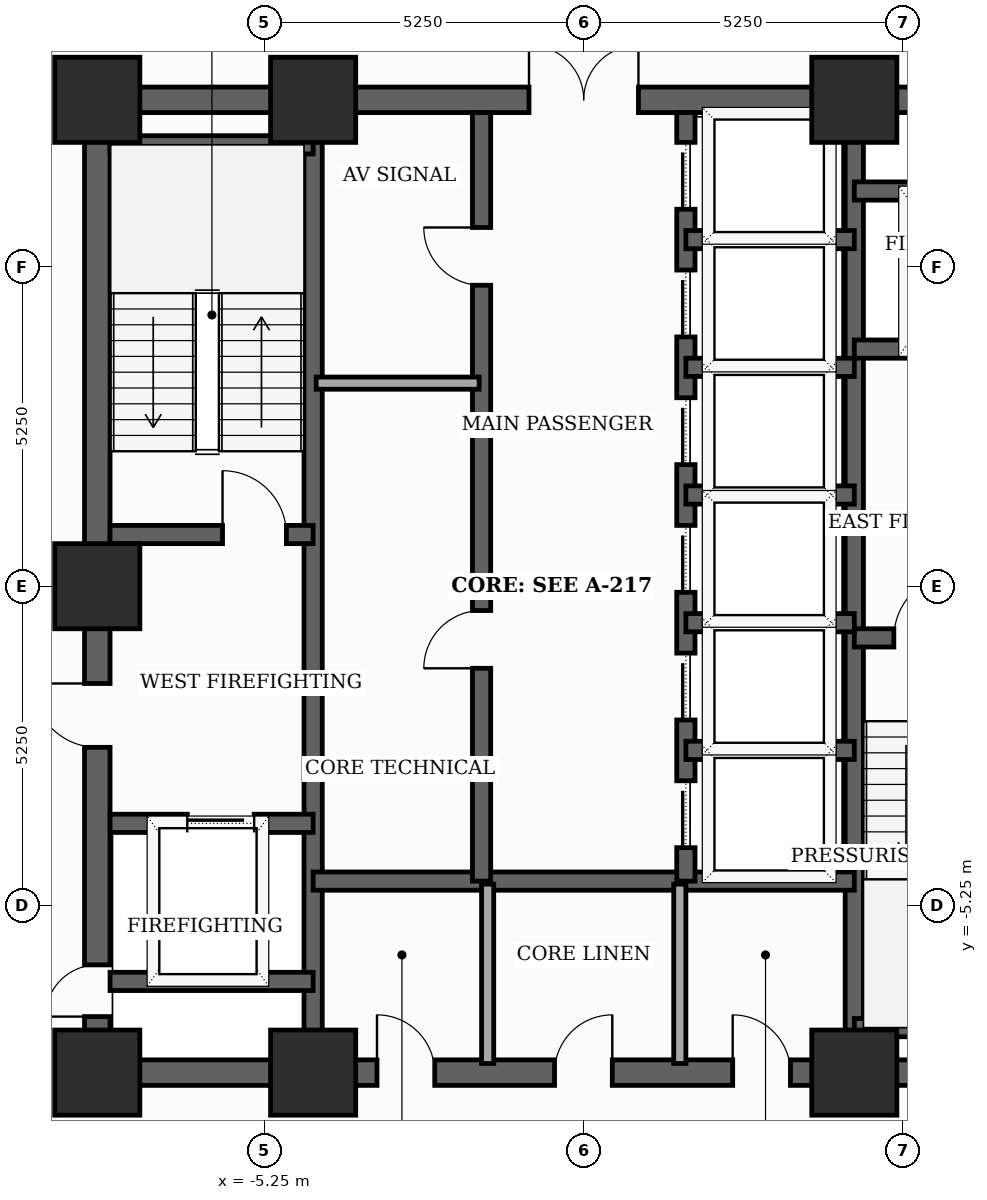
"""IFC4 building model, lengths in metres.
Left out: names, types, materials, properties, quantities, classifications, styles, units other than length and angle.
Written with IfcOpenShell. Run it as: python <this file> out.ifc"""

import sys

from ifc_helpers import new_model, si_unit, direction, frame, frame_2d, origin, origin_2d, place, context, subcontext, project, spatial, rectangle, extrude, element, fill, save


model = new_model("IFC4")
c1 = context("Model", 3, precision=1e-05, world=origin(), true_north=direction((0.0, 1.0)))
c2 = subcontext(c1, "Body", "Model", "MODEL_VIEW")
j1 = project(units=[si_unit("LENGTHUNIT", "METRE"), si_unit("PLANEANGLEUNIT", "RADIAN")], contexts=[c1])
p1 = place(None, origin())
s1 = spatial("IfcSite", under=j1, at=p1, CompositionType="ELEMENT")
p2 = place(p1, origin())
s2 = spatial("IfcBuilding", under=s1, at=p2, CompositionType="ELEMENT")
p3 = place(p2, frame((0.0, 0.0, 138.4)))
s3 = spatial("IfcBuildingStorey", under=s2, at=p3, CompositionType="ELEMENT", Elevation=138.4)
for number, where, z_axis, x_axis in (
    (1, (-8.0, -8.0, 0.0), (0.0, 0.0, 1.0), (1.0, 0.0, 0.0)),
    (2, (-4.45, -8.0, 0.0), (0.0, 0.0, 1.0), (1.0, 0.0, 0.0)),
    (3, (4.45, -8.0, 0.0), (0.0, 0.0, 1.0), (1.0, 0.0, 0.0)),
    (4, (4.45, 8.0, 0.0), (0.0, 0.0, 1.0), (1.0, 0.0, 0.0)),
    (5, (-4.45, 8.0, 0.0), (0.0, 0.0, 1.0), (1.0, 0.0, 0.0)),
    (6, (-8.0, 8.0, 0.0), (0.0, 0.0, 1.0), (1.0, 0.0, 0.0)),
    (7, (-8.0, 0.0, 0.0), (0.0, 0.0, 1.0), (1.0, 0.0, 0.0)),
):
    element("IfcColumn", number, at=place(p3, frame(where, z_axis=z_axis, x_axis=x_axis)), inside=s3, PredefinedType="COLUMN", context=c2, shape_type="SweptSolid", body=[
        extrude(rectangle(XDim=1.4, YDim=1.4, at=origin_2d()), origin(), (0.0, 0.0, 1.0), 3.7),
    ])
p4 = place(p3, frame((-8.0, -8.0, 0.0), z_axis=(0.0, 0.0, 1.0), x_axis=(0.0, 1.0, 0.0)))
e8 = element("IfcWall", 8, at=p4, inside=s3, PredefinedType="SHEAR", context=c2, shape_type="SweptSolid", body=[
    extrude(rectangle(XDim=16.0, YDim=0.42, at=frame_2d((8.0, 0.0))), origin(), (0.0, 0.0, 1.0), 3.5),
])
p5 = place(p4, frame((0.922, 0.0, 0.0)))
e9 = element("IfcOpeningElement", 9, at=p5, cuts=e8, PredefinedType="OPENING", context=c2, shape_type="SweptSolid", body=[
    extrude(rectangle(XDim=0.85, YDim=2.02, at=frame_2d((0.425, 1.01))), frame((0.0, 0.22, 0.0), z_axis=(0.0, -1.0, 0.0), x_axis=(1.0, 0.0, 0.0)), (0.0, 0.0, 1.0), 0.44),
])
p6 = place(p4, frame((5.35, 0.0, 0.0)))
e10 = element("IfcOpeningElement", 10, at=p6, cuts=e8, PredefinedType="OPENING", context=c2, shape_type="SweptSolid", body=[
    extrude(rectangle(XDim=1.05, YDim=2.15, at=frame_2d((0.525, 1.075))), frame((0.0, 0.22, 0.0), z_axis=(0.0, -1.0, 0.0), x_axis=(1.0, 0.0, 0.0)), (0.0, 0.0, 1.0), 0.44),
])
p7 = place(p3, frame((-8.0, -8.0, 0.0), z_axis=(0.0, 0.0, 1.0), x_axis=(1.0, 0.0, 0.0)))
e11 = element("IfcWall", 11, at=p7, inside=s3, PredefinedType="SHEAR", context=c2, shape_type="SweptSolid", body=[
    extrude(rectangle(XDim=16.0, YDim=0.42, at=frame_2d((8.0, 0.0))), origin(), (0.0, 0.0, 1.0), 3.5),
])
p8 = place(p7, frame((4.6, 0.0, 0.0)))
e12 = element("IfcOpeningElement", 12, at=p8, cuts=e11, PredefinedType="OPENING", context=c2, shape_type="SweptSolid", body=[
    extrude(rectangle(XDim=0.95, YDim=2.1, at=frame_2d((0.475, 1.05))), frame((0.0, 0.22, 0.0), z_axis=(0.0, -1.0, 0.0), x_axis=(1.0, 0.0, 0.0)), (0.0, 0.0, 1.0), 0.44),
])
p9 = place(p7, frame((7.52, 0.0, 0.0)))
e13 = element("IfcOpeningElement", 13, at=p9, cuts=e11, PredefinedType="OPENING", context=c2, shape_type="SweptSolid", body=[
    extrude(rectangle(XDim=0.95, YDim=2.1, at=frame_2d((0.475, 1.05))), frame((0.0, 0.22, 0.0), z_axis=(0.0, -1.0, 0.0), x_axis=(1.0, 0.0, 0.0)), (0.0, 0.0, 1.0), 0.44),
])
p10 = place(p7, frame((10.45, 0.0, 0.0)))
e14 = element("IfcOpeningElement", 14, at=p10, cuts=e11, PredefinedType="OPENING", context=c2, shape_type="SweptSolid", body=[
    extrude(rectangle(XDim=0.95, YDim=2.1, at=frame_2d((0.475, 1.05))), frame((0.0, 0.22, 0.0), z_axis=(0.0, -1.0, 0.0), x_axis=(1.0, 0.0, 0.0)), (0.0, 0.0, 1.0), 0.44),
])
p11 = place(p3, frame((-8.0, 8.0, 0.0), z_axis=(0.0, 0.0, 1.0), x_axis=(1.0, 0.0, 0.0)))
e15 = element("IfcWall", 15, at=p11, inside=s3, PredefinedType="SHEAR", context=c2, shape_type="SweptSolid", body=[
    extrude(rectangle(XDim=16.0, YDim=0.42, at=frame_2d((8.0, 0.0))), origin(), (0.0, 0.0, 1.0), 3.5),
])
p12 = place(p11, frame((7.1, 0.0, 0.0)))
e16 = element("IfcOpeningElement", 16, at=p12, cuts=e15, PredefinedType="OPENING", context=c2, shape_type="SweptSolid", body=[
    extrude(rectangle(XDim=1.8, YDim=2.15, at=frame_2d((0.9, 1.075))), frame((0.0, 0.22, 0.0), z_axis=(0.0, -1.0, 0.0), x_axis=(1.0, 0.0, 0.0)), (0.0, 0.0, 1.0), 0.44),
])
for number, where, z_axis, x_axis in (
    (17, (-4.45, -7.79, 0.0), (0.0, 0.0, 1.0), (0.0, 1.0, 0.0)),
    (18, (4.45, -7.79, 0.0), (0.0, 0.0, 1.0), (0.0, 1.0, 0.0)),
):
    element("IfcWall", number, at=place(p3, frame(where, z_axis=z_axis, x_axis=x_axis)), inside=s3, PredefinedType="SHEAR", context=c2, shape_type="SweptSolid", body=[
        extrude(rectangle(XDim=15.58, YDim=0.3, at=frame_2d((7.79, 0.0))), origin(), (0.0, 0.0, 1.0), 3.5),
    ])
p13 = place(p3, frame((-7.79, 0.85, 0.0), z_axis=(0.0, 0.0, 1.0), x_axis=(1.0, 0.0, 0.0)))
e19 = element("IfcWall", 19, at=p13, inside=s3, PredefinedType="SHEAR", context=c2, shape_type="SweptSolid", body=[
    extrude(rectangle(XDim=3.34, YDim=0.3, at=frame_2d((1.67, 0.0))), origin(), (0.0, 0.0, 1.0), 3.5),
])
p14 = place(p13, frame((1.85, 0.0, 0.0)))
e20 = element("IfcOpeningElement", 20, at=p14, cuts=e19, PredefinedType="OPENING", context=c2, shape_type="SweptSolid", body=[
    extrude(rectangle(XDim=1.05, YDim=2.15, at=frame_2d((0.525, 1.075))), frame((0.0, 0.16, 0.0), z_axis=(0.0, -1.0, 0.0), x_axis=(1.0, 0.0, 0.0)), (0.0, 0.0, 1.0), 0.32),
])
p15 = place(p3, frame((-7.79, 7.26, 0.0), z_axis=(0.0, 0.0, 1.0), x_axis=(1.0, 0.0, 0.0)))
e21 = element("IfcWall", 21, at=p15, inside=s3, PredefinedType="SHEAR", context=c2, shape_type="SweptSolid", body=[
    extrude(rectangle(XDim=3.34, YDim=0.3, at=frame_2d((1.67, 0.0))), origin(), (0.0, 0.0, 1.0), 3.5),
])
p16 = place(p3, frame((4.45, -0.85, 0.0), z_axis=(0.0, 0.0, 1.0), x_axis=(1.0, 0.0, 0.0)))
e22 = element("IfcWall", 22, at=p16, inside=s3, PredefinedType="SHEAR", context=c2, shape_type="SweptSolid", body=[
    extrude(rectangle(XDim=3.34, YDim=0.3, at=frame_2d((1.67, 0.0))), origin(), (0.0, 0.0, 1.0), 3.5),
])
p17 = place(p16, frame((0.65, 0.0, 0.0)))
e23 = element("IfcOpeningElement", 23, at=p17, cuts=e22, PredefinedType="OPENING", context=c2, shape_type="SweptSolid", body=[
    extrude(rectangle(XDim=1.05, YDim=2.15, at=frame_2d((0.525, 1.075))), frame((0.0, 0.16, 0.0), z_axis=(0.0, -1.0, 0.0), x_axis=(1.0, 0.0, 0.0)), (0.0, 0.0, 1.0), 0.32),
])
p18 = place(p3, frame((4.45, -7.26, 0.0), z_axis=(0.0, 0.0, 1.0), x_axis=(1.0, 0.0, 0.0)))
e24 = element("IfcWall", 24, at=p18, inside=s3, PredefinedType="SHEAR", context=c2, shape_type="SweptSolid", body=[
    extrude(rectangle(XDim=3.55, YDim=0.3, at=frame_2d((1.775, 0.0))), origin(), (0.0, 0.0, 1.0), 3.5),
])
p19 = place(p3, frame((-7.79, -3.9, 0.0), z_axis=(0.0, 0.0, 1.0), x_axis=(1.0, 0.0, 0.0)))
e25 = element("IfcWall", 25, at=p19, inside=s3, PredefinedType="SHEAR", context=c2, shape_type="SweptSolid", body=[
    extrude(rectangle(XDim=3.34, YDim=0.3, at=frame_2d((1.67, 0.0))), origin(), (0.0, 0.0, 1.0), 3.5),
])
p20 = place(p19, frame((1.27, 0.0, 0.0)))
e26 = element("IfcOpeningElement", 26, at=p20, cuts=e25, PredefinedType="OPENING", context=c2, shape_type="SweptSolid", body=[
    extrude(rectangle(XDim=1.1, YDim=2.1, at=frame_2d((0.55, 1.05))), frame((0.0, 0.16, 0.0), z_axis=(0.0, -1.0, 0.0), x_axis=(1.0, 0.0, 0.0)), (0.0, 0.0, 1.0), 0.32),
])
p21 = place(p3, frame((-7.79, -6.5, 0.0), z_axis=(0.0, 0.0, 1.0), x_axis=(1.0, 0.0, 0.0)))
e27 = element("IfcWall", 27, at=p21, inside=s3, PredefinedType="SHEAR", context=c2, shape_type="SweptSolid", body=[
    extrude(rectangle(XDim=3.34, YDim=0.3, at=frame_2d((1.67, 0.0))), origin(), (0.0, 0.0, 1.0), 3.5),
])
p22 = place(p3, frame((4.45, 3.9, 0.0), z_axis=(0.0, 0.0, 1.0), x_axis=(1.0, 0.0, 0.0)))
e28 = element("IfcWall", 28, at=p22, inside=s3, PredefinedType="SHEAR", context=c2, shape_type="SweptSolid", body=[
    extrude(rectangle(XDim=3.34, YDim=0.3, at=frame_2d((1.67, 0.0))), origin(), (0.0, 0.0, 1.0), 3.5),
])
p23 = place(p22, frame((1.18, 0.0, 0.0)))
e29 = element("IfcOpeningElement", 29, at=p23, cuts=e28, PredefinedType="OPENING", context=c2, shape_type="SweptSolid", body=[
    extrude(rectangle(XDim=1.1, YDim=2.1, at=frame_2d((0.55, 1.05))), frame((0.0, 0.16, 0.0), z_axis=(0.0, -1.0, 0.0), x_axis=(1.0, 0.0, 0.0)), (0.0, 0.0, 1.0), 0.32),
])
p24 = place(p3, frame((4.45, 6.5, 0.0), z_axis=(0.0, 0.0, 1.0), x_axis=(1.0, 0.0, 0.0)))
e30 = element("IfcWall", 30, at=p24, inside=s3, PredefinedType="SHEAR", context=c2, shape_type="SweptSolid", body=[
    extrude(rectangle(XDim=3.34, YDim=0.3, at=frame_2d((1.67, 0.0))), origin(), (0.0, 0.0, 1.0), 3.5),
])
p25 = place(p3, frame((-4.45, -4.85, 0.0), z_axis=(0.0, 0.0, 1.0), x_axis=(1.0, 0.0, 0.0)))
e31 = element("IfcWall", 31, at=p25, inside=s3, PredefinedType="SHEAR", context=c2, shape_type="SweptSolid", body=[
    extrude(rectangle(XDim=8.9, YDim=0.3, at=frame_2d((4.45, 0.0))), origin(), (0.0, 0.0, 1.0), 3.5),
])
p26 = place(p3, frame((-1.68, -4.85, 0.0), z_axis=(0.0, 0.0, 1.0), x_axis=(0.0, 1.0, 0.0)))
e32 = element("IfcWall", 32, at=p26, inside=s3, PredefinedType="SHEAR", context=c2, shape_type="SweptSolid", body=[
    extrude(rectangle(XDim=12.64, YDim=0.3, at=frame_2d((6.32, 0.0))), origin(), (0.0, 0.0, 1.0), 3.5),
])
p27 = place(p26, frame((3.5, 0.0, 0.0)))
e33 = element("IfcOpeningElement", 33, at=p27, cuts=e32, PredefinedType="OPENING", context=c2, shape_type="SweptSolid", body=[
    extrude(rectangle(XDim=0.95, YDim=2.1, at=frame_2d((0.475, 1.05))), frame((0.0, 0.16, 0.0), z_axis=(0.0, -1.0, 0.0), x_axis=(1.0, 0.0, 0.0)), (0.0, 0.0, 1.0), 0.32),
])
p28 = place(p26, frame((9.8, 0.0, 0.0)))
e34 = element("IfcOpeningElement", 34, at=p28, cuts=e32, PredefinedType="OPENING", context=c2, shape_type="SweptSolid", body=[
    extrude(rectangle(XDim=0.95, YDim=2.1, at=frame_2d((0.475, 1.05))), frame((0.0, 0.16, 0.0), z_axis=(0.0, -1.0, 0.0), x_axis=(1.0, 0.0, 0.0)), (0.0, 0.0, 1.0), 0.32),
])
p29 = place(p3, frame((1.68, -4.85, 0.0), z_axis=(0.0, 0.0, 1.0), x_axis=(0.0, 1.0, 0.0)))
e35 = element("IfcWall", 35, at=p29, inside=s3, PredefinedType="SHEAR", context=c2, shape_type="SweptSolid", body=[
    extrude(rectangle(XDim=12.64, YDim=0.3, at=frame_2d((6.32, 0.0))), origin(), (0.0, 0.0, 1.0), 3.5),
])
p30 = place(p29, frame((0.55, 0.0, 0.0)))
e36 = element("IfcOpeningElement", 36, at=p30, cuts=e35, PredefinedType="OPENING", context=c2, shape_type="SweptSolid", body=[
    extrude(rectangle(XDim=1.1, YDim=2.1, at=frame_2d((0.55, 1.05))), frame((0.0, 0.16, 0.0), z_axis=(0.0, -1.0, 0.0), x_axis=(1.0, 0.0, 0.0)), (0.0, 0.0, 1.0), 0.32),
])
p31 = place(p29, frame((2.65, 0.0, 0.0)))
e37 = element("IfcOpeningElement", 37, at=p31, cuts=e35, PredefinedType="OPENING", context=c2, shape_type="SweptSolid", body=[
    extrude(rectangle(XDim=1.1, YDim=2.1, at=frame_2d((0.55, 1.05))), frame((0.0, 0.16, 0.0), z_axis=(0.0, -1.0, 0.0), x_axis=(1.0, 0.0, 0.0)), (0.0, 0.0, 1.0), 0.32),
])
p32 = place(p29, frame((4.75, 0.0, 0.0)))
e38 = element("IfcOpeningElement", 38, at=p32, cuts=e35, PredefinedType="OPENING", context=c2, shape_type="SweptSolid", body=[
    extrude(rectangle(XDim=1.1, YDim=2.1, at=frame_2d((0.55, 1.05))), frame((0.0, 0.16, 0.0), z_axis=(0.0, -1.0, 0.0), x_axis=(1.0, 0.0, 0.0)), (0.0, 0.0, 1.0), 0.32),
])
p33 = place(p29, frame((6.85, 0.0, 0.0)))
e39 = element("IfcOpeningElement", 39, at=p33, cuts=e35, PredefinedType="OPENING", context=c2, shape_type="SweptSolid", body=[
    extrude(rectangle(XDim=1.1, YDim=2.1, at=frame_2d((0.55, 1.05))), frame((0.0, 0.16, 0.0), z_axis=(0.0, -1.0, 0.0), x_axis=(1.0, 0.0, 0.0)), (0.0, 0.0, 1.0), 0.32),
])
p34 = place(p29, frame((8.95, 0.0, 0.0)))
e40 = element("IfcOpeningElement", 40, at=p34, cuts=e35, PredefinedType="OPENING", context=c2, shape_type="SweptSolid", body=[
    extrude(rectangle(XDim=1.1, YDim=2.1, at=frame_2d((0.55, 1.05))), frame((0.0, 0.16, 0.0), z_axis=(0.0, -1.0, 0.0), x_axis=(1.0, 0.0, 0.0)), (0.0, 0.0, 1.0), 0.32),
])
p35 = place(p29, frame((11.05, 0.0, 0.0)))
e41 = element("IfcOpeningElement", 41, at=p35, cuts=e35, PredefinedType="OPENING", context=c2, shape_type="SweptSolid", body=[
    extrude(rectangle(XDim=1.1, YDim=2.1, at=frame_2d((0.55, 1.05))), frame((0.0, 0.16, 0.0), z_axis=(0.0, -1.0, 0.0), x_axis=(1.0, 0.0, 0.0)), (0.0, 0.0, 1.0), 0.32),
])
for number, where, z_axis, x_axis in (
    (42, (1.68, 1.5, 0.0), (0.0, 0.0, 1.0), (1.0, 0.0, 0.0)),
    (43, (1.68, 3.6, 0.0), (0.0, 0.0, 1.0), (1.0, 0.0, 0.0)),
    (44, (1.68, 5.7, 0.0), (0.0, 0.0, 1.0), (1.0, 0.0, 0.0)),
    (45, (1.68, -2.7, 0.0), (0.0, 0.0, 1.0), (1.0, 0.0, 0.0)),
    (46, (1.68, -0.6, 0.0), (0.0, 0.0, 1.0), (1.0, 0.0, 0.0)),
):
    element("IfcWall", number, at=place(p3, frame(where, z_axis=z_axis, x_axis=x_axis)), inside=s3, PredefinedType="SHEAR", context=c2, shape_type="SweptSolid", body=[
        extrude(rectangle(XDim=2.77, YDim=0.3, at=frame_2d((1.385, 0.0))), origin(), (0.0, 0.0, 1.0), 3.5),
    ])
for number, where, z_axis, x_axis in (
    (47, (-1.58, -7.85, 0.0), (0.0, 0.0, 1.0), (0.0, 1.0, 0.0)),
    (48, (1.58, -7.85, 0.0), (0.0, 0.0, 1.0), (0.0, 1.0, 0.0)),
):
    element("IfcWall", number, at=place(p3, frame(where, z_axis=z_axis, x_axis=x_axis)), inside=s3, PredefinedType="SOLIDWALL", context=c2, shape_type="SweptSolid", body=[
        extrude(rectangle(XDim=2.95, YDim=0.2, at=frame_2d((1.475, 0.0))), origin(), (0.0, 0.0, 1.0), 2.885),
    ])
p36 = place(p3, frame((-4.4, 3.34, 0.0), z_axis=(0.0, 0.0, 1.0), x_axis=(1.0, 0.0, 0.0)))
e49 = element("IfcWall", 49, at=p36, inside=s3, PredefinedType="SOLIDWALL", context=c2, shape_type="SweptSolid", body=[
    extrude(rectangle(XDim=2.68, YDim=0.2, at=frame_2d((1.34, 0.0))), origin(), (0.0, 0.0, 1.0), 3.5),
])
p37 = place(p5, origin())
e50 = element("IfcDoor", 50, at=p37, inside=s3, OperationType="SINGLE_SWING_LEFT", PredefinedType="TRAPDOOR", context=c2, shape_type="SweptSolid", body=[
    extrude(rectangle(XDim=0.85, YDim=2.02, at=frame_2d((0.425, 1.01))), frame((0.0, 0.025, 0.0), z_axis=(0.0, -1.0, 0.0), x_axis=(1.0, 0.0, 0.0)), (0.0, 0.0, 1.0), 0.05),
])
fill(e9, e50)
p38 = place(p6, origin())
e51 = element("IfcDoor", 51, at=p38, inside=s3, OperationType="SINGLE_SWING_RIGHT", PredefinedType="DOOR", context=c2, shape_type="SweptSolid", body=[
    extrude(rectangle(XDim=1.05, YDim=2.15, at=frame_2d((0.525, 1.075))), frame((0.0, 0.025, 0.0), z_axis=(0.0, -1.0, 0.0), x_axis=(1.0, 0.0, 0.0)), (0.0, 0.0, 1.0), 0.05),
])
fill(e10, e51)
p39 = place(p8, origin())
e52 = element("IfcDoor", 52, at=p39, inside=s3, OperationType="SINGLE_SWING_LEFT", PredefinedType="DOOR", context=c2, shape_type="SweptSolid", body=[
    extrude(rectangle(XDim=0.95, YDim=2.1, at=frame_2d((0.475, 1.05))), frame((0.0, 0.025, 0.0), z_axis=(0.0, -1.0, 0.0), x_axis=(1.0, 0.0, 0.0)), (0.0, 0.0, 1.0), 0.05),
])
fill(e12, e52)
p40 = place(p9, origin())
e53 = element("IfcDoor", 53, at=p40, inside=s3, OperationType="SINGLE_SWING_RIGHT", PredefinedType="DOOR", context=c2, shape_type="SweptSolid", body=[
    extrude(rectangle(XDim=0.95, YDim=2.1, at=frame_2d((0.475, 1.05))), frame((0.0, 0.025, 0.0), z_axis=(0.0, -1.0, 0.0), x_axis=(1.0, 0.0, 0.0)), (0.0, 0.0, 1.0), 0.05),
])
fill(e13, e53)
p41 = place(p10, origin())
e54 = element("IfcDoor", 54, at=p41, inside=s3, OperationType="SINGLE_SWING_LEFT", PredefinedType="DOOR", context=c2, shape_type="SweptSolid", body=[
    extrude(rectangle(XDim=0.95, YDim=2.1, at=frame_2d((0.475, 1.05))), frame((0.0, 0.025, 0.0), z_axis=(0.0, -1.0, 0.0), x_axis=(1.0, 0.0, 0.0)), (0.0, 0.0, 1.0), 0.05),
])
fill(e14, e54)
p42 = place(p12, origin())
e55 = element("IfcDoor", 55, at=p42, inside=s3, OperationType="DOUBLE_DOOR_SINGLE_SWING", PredefinedType="DOOR", context=c2, shape_type="SweptSolid", body=[
    extrude(rectangle(XDim=1.8, YDim=2.15, at=frame_2d((0.9, 1.075))), frame((0.0, 0.025, 0.0), z_axis=(0.0, -1.0, 0.0), x_axis=(1.0, 0.0, 0.0)), (0.0, 0.0, 1.0), 0.05),
])
fill(e16, e55)
p43 = place(p14, origin())
e56 = element("IfcDoor", 56, at=p43, inside=s3, OperationType="SINGLE_SWING_LEFT", PredefinedType="DOOR", context=c2, shape_type="SweptSolid", body=[
    extrude(rectangle(XDim=1.05, YDim=2.15, at=frame_2d((0.525, 1.075))), frame((0.0, 0.025, 0.0), z_axis=(0.0, -1.0, 0.0), x_axis=(1.0, 0.0, 0.0)), (0.0, 0.0, 1.0), 0.05),
])
fill(e20, e56)
p44 = place(p17, origin())
e57 = element("IfcDoor", 57, at=p44, inside=s3, OperationType="SINGLE_SWING_RIGHT", PredefinedType="DOOR", context=c2, shape_type="SweptSolid", body=[
    extrude(rectangle(XDim=1.05, YDim=2.15, at=frame_2d((0.525, 1.075))), frame((0.0, 0.025, 0.0), z_axis=(0.0, -1.0, 0.0), x_axis=(1.0, 0.0, 0.0)), (0.0, 0.0, 1.0), 0.05),
])
fill(e23, e57)
p45 = place(p20, origin())
e58 = element("IfcDoor", 58, at=p45, inside=s3, OperationType="SLIDING_TO_LEFT", PredefinedType="DOOR", context=c2, shape_type="SweptSolid", body=[
    extrude(rectangle(XDim=1.1, YDim=2.1, at=frame_2d((0.55, 1.05))), frame((0.0, 0.025, 0.0), z_axis=(0.0, -1.0, 0.0), x_axis=(1.0, 0.0, 0.0)), (0.0, 0.0, 1.0), 0.05),
])
fill(e26, e58)
p46 = place(p27, origin())
e59 = element("IfcDoor", 59, at=p46, inside=s3, OperationType="SINGLE_SWING_LEFT", PredefinedType="DOOR", context=c2, shape_type="SweptSolid", body=[
    extrude(rectangle(XDim=0.95, YDim=2.1, at=frame_2d((0.475, 1.05))), frame((0.0, 0.025, 0.0), z_axis=(0.0, -1.0, 0.0), x_axis=(1.0, 0.0, 0.0)), (0.0, 0.0, 1.0), 0.05),
])
fill(e33, e59)
p47 = place(p28, origin())
e60 = element("IfcDoor", 60, at=p47, inside=s3, OperationType="SINGLE_SWING_RIGHT", PredefinedType="DOOR", context=c2, shape_type="SweptSolid", body=[
    extrude(rectangle(XDim=0.95, YDim=2.1, at=frame_2d((0.475, 1.05))), frame((0.0, 0.025, 0.0), z_axis=(0.0, -1.0, 0.0), x_axis=(1.0, 0.0, 0.0)), (0.0, 0.0, 1.0), 0.05),
])
fill(e34, e60)
p48 = place(p30, origin())
e61 = element("IfcDoor", 61, at=p48, inside=s3, OperationType="SLIDING_TO_LEFT", PredefinedType="DOOR", context=c2, shape_type="SweptSolid", body=[
    extrude(rectangle(XDim=1.1, YDim=2.1, at=frame_2d((0.55, 1.05))), frame((0.0, 0.025, 0.0), z_axis=(0.0, -1.0, 0.0), x_axis=(1.0, 0.0, 0.0)), (0.0, 0.0, 1.0), 0.05),
])
fill(e36, e61)
p49 = place(p31, origin())
e62 = element("IfcDoor", 62, at=p49, inside=s3, OperationType="SLIDING_TO_LEFT", PredefinedType="DOOR", context=c2, shape_type="SweptSolid", body=[
    extrude(rectangle(XDim=1.1, YDim=2.1, at=frame_2d((0.55, 1.05))), frame((0.0, 0.025, 0.0), z_axis=(0.0, -1.0, 0.0), x_axis=(1.0, 0.0, 0.0)), (0.0, 0.0, 1.0), 0.05),
])
fill(e37, e62)
p50 = place(p32, origin())
e63 = element("IfcDoor", 63, at=p50, inside=s3, OperationType="SLIDING_TO_LEFT", PredefinedType="DOOR", context=c2, shape_type="SweptSolid", body=[
    extrude(rectangle(XDim=1.1, YDim=2.1, at=frame_2d((0.55, 1.05))), frame((0.0, 0.025, 0.0), z_axis=(0.0, -1.0, 0.0), x_axis=(1.0, 0.0, 0.0)), (0.0, 0.0, 1.0), 0.05),
])
fill(e38, e63)
p51 = place(p33, origin())
e64 = element("IfcDoor", 64, at=p51, inside=s3, OperationType="SLIDING_TO_LEFT", PredefinedType="DOOR", context=c2, shape_type="SweptSolid", body=[
    extrude(rectangle(XDim=1.1, YDim=2.1, at=frame_2d((0.55, 1.05))), frame((0.0, 0.025, 0.0), z_axis=(0.0, -1.0, 0.0), x_axis=(1.0, 0.0, 0.0)), (0.0, 0.0, 1.0), 0.05),
])
fill(e39, e64)
p52 = place(p34, origin())
e65 = element("IfcDoor", 65, at=p52, inside=s3, OperationType="SLIDING_TO_LEFT", PredefinedType="DOOR", context=c2, shape_type="SweptSolid", body=[
    extrude(rectangle(XDim=1.1, YDim=2.1, at=frame_2d((0.55, 1.05))), frame((0.0, 0.025, 0.0), z_axis=(0.0, -1.0, 0.0), x_axis=(1.0, 0.0, 0.0)), (0.0, 0.0, 1.0), 0.05),
])
fill(e40, e65)
p53 = place(p35, origin())
e66 = element("IfcDoor", 66, at=p53, inside=s3, OperationType="SLIDING_TO_LEFT", PredefinedType="DOOR", context=c2, shape_type="SweptSolid", body=[
    extrude(rectangle(XDim=1.1, YDim=2.1, at=frame_2d((0.55, 1.05))), frame((0.0, 0.025, 0.0), z_axis=(0.0, -1.0, 0.0), x_axis=(1.0, 0.0, 0.0)), (0.0, 0.0, 1.0), 0.05),
])
fill(e41, e66)
save(model, sys.argv[1])
